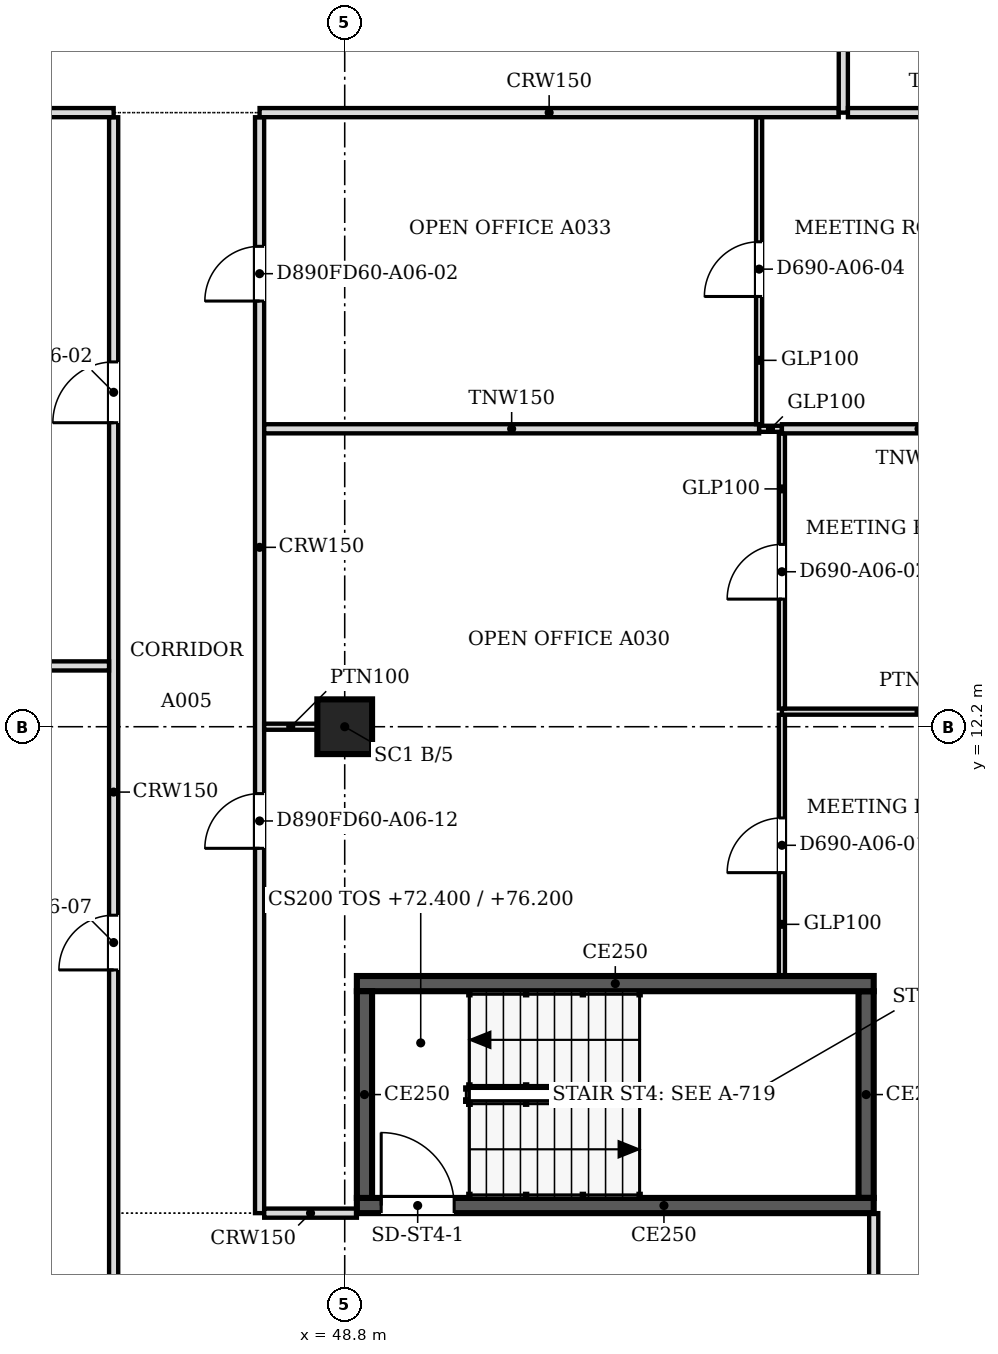
"""IFC4 building model, lengths in metres.
Left out: names, types, materials, properties, quantities, classifications, styles, units other than length and angle.
Written with IfcOpenShell. Run it as: python <this file> out.ifc"""

import sys

from ifc_helpers import new_model, si_unit, direction, frame, frame_2d, origin, origin_2d, place, context, subcontext, project, spatial, polyline, rectangle, outline, extrude, faceted_brep, source, transform, mapped, element, fill, save


model = new_model("IFC4")
c1 = context("Model", 3, precision=1e-05, world=origin(), true_north=direction((0.0, 1.0)))
c2 = subcontext(c1, "Body", "Model", "MODEL_VIEW")
j1 = project(units=[si_unit("LENGTHUNIT", "METRE"), si_unit("PLANEANGLEUNIT", "RADIAN")], contexts=[c1])
p1 = place(None, origin())
s1 = spatial("IfcSite", under=j1, at=p1, CompositionType="ELEMENT")
p2 = place(p1, origin())
s2 = spatial("IfcBuilding", under=s1, at=p2, CompositionType="ELEMENT")
p3 = place(p2, frame((0.0, 0.0, 72.4)))
s3 = spatial("IfcBuildingStorey", under=s2, at=p3, CompositionType="ELEMENT", Elevation=72.4)
p4 = place(p3, frame((48.8, 12.2, 0.0), z_axis=(0.0, 0.0, 1.0), x_axis=(1.0, 0.0, 0.0)))
e1 = element("IfcColumn", 1, at=p4, inside=s3, PredefinedType="COLUMN", context=c2, shape_type="SweptSolid", body=[
    extrude(rectangle(XDim=0.9, YDim=0.9, at=origin_2d()), origin(), (0.0, 0.0, 1.0), 3.6),
])
m1 = source(origin(), c2, "Body", "Brep", [
    faceted_brep([(0.053, -0.25, 0.0), (2.997, -0.25, 3.8), (0.053, -0.25, 7.6), (0.0, -0.25, 7.532), (0.0, -0.25, 0.068), (0.106, 0.25, 7.531), (2.944, 0.25, 3.868), (2.944, 0.25, 3.732), (0.106, 0.25, 0.068), (2.997, 0.0, 3.8), (0.053, 0.0, 0.0), (0.053, 0.0, 7.6)], [[[0, 1, 2, 3, 4]], [[5, 6, 7, 8]], [[8, 7, 9, 1, 0, 10]], [[6, 5, 11, 2, 1, 9]], [[3, 2, 11]], [[10, 0, 4]], [[8, 10, 4, 3, 11, 5]], [[9, 7, 6]]]),
])
p5 = place(p3, frame((57.569, 1.274, -3.8), z_axis=(0.0, 0.0, 1.0), x_axis=(0.707066050402, 0.707147509625, 0.0)))
e2 = element("IfcWall", 2, at=p5, inside=s3, PredefinedType="SOLIDWALL", context=c2, shape_type="MappedRepresentation", body=[
    mapped(m1, transform((0.0, 0.0, 0.0), scale=1.0)),
])
m2 = source(origin(), c2, "Body", "SweptSolid", [
    extrude(outline(polyline([(0.253, 0.666), (2.681, 3.8), (0.253, 6.934), (0.253, 0.666)])), frame((0.0, 0.26, 0.0), z_axis=(0.0, -1.0, 0.0), x_axis=(1.0, 0.0, 0.0)), (0.0, 0.0, 1.0), 0.52),
])
p6 = place(p5, origin())
e3 = element("IfcOpeningElement", 3, at=p6, cuts=e2, PredefinedType="OPENING", context=c2, shape_type="MappedRepresentation", body=[
    mapped(m2, transform((0.0, 0.0, 0.0), scale=1.0)),
])
p7 = place(p2, frame((0.0, 0.0, 76.2)))
s4 = spatial("IfcBuildingStorey", under=s2, at=p7, CompositionType="ELEMENT", Elevation=76.2)
m3 = source(origin(), c2, "Body", "Brep", [
    faceted_brep([(2.944, -0.25, 0.0), (2.997, -0.25, 0.068), (2.997, -0.25, 7.532), (2.944, -0.25, 7.6), (0.0, -0.25, 3.8), (0.053, 0.25, 3.868), (2.891, 0.25, 7.532), (2.891, 0.25, 0.068), (0.053, 0.25, 3.732), (2.944, 0.0, 0.0), (2.944, 0.0, 7.6), (0.0, 0.0, 3.8)], [[[0, 1, 2, 3, 4]], [[5, 6, 7, 8]], [[1, 0, 9]], [[10, 3, 2]], [[6, 5, 11, 4, 3, 10]], [[8, 7, 9, 0, 4, 11]], [[8, 11, 5]], [[1, 9, 7, 6, 10, 2]]]),
])
p8 = place(p7, frame((57.606, 1.312, -3.8), z_axis=(0.0, 0.0, 1.0), x_axis=(0.707147509625, 0.707066050402, 0.0)))
e4 = element("IfcWall", 4, at=p8, inside=s4, PredefinedType="SOLIDWALL", context=c2, shape_type="MappedRepresentation", body=[
    mapped(m3, transform((0.0, 0.0, 0.0), scale=1.0)),
])
m4 = source(origin(), c2, "Body", "SweptSolid", [
    extrude(outline(polyline([(2.744, 6.934), (0.316, 3.8), (2.744, 0.667), (2.744, 6.934)])), frame((0.0, 0.26, 0.0), z_axis=(0.0, -1.0, 0.0), x_axis=(1.0, 0.0, 0.0)), (0.0, 0.0, 1.0), 0.52),
])
p9 = place(p8, origin())
e5 = element("IfcOpeningElement", 5, at=p9, cuts=e4, PredefinedType="OPENING", context=c2, shape_type="MappedRepresentation", body=[
    mapped(m4, transform((0.0, 0.0, 0.0), scale=1.0)),
])
p10 = place(p3, frame((57.5, 4.325, 0.0), z_axis=(0.0, 0.0, 1.0), x_axis=(-1.0, 0.0, 0.0)))
e6 = element("IfcWall", 6, at=p10, inside=s3, PredefinedType="SOLIDWALL", context=c2, shape_type="SweptSolid", body=[
    extrude(rectangle(XDim=8.5, YDim=0.25, at=frame_2d((4.25, 0.0))), origin(), (0.0, 0.0, 1.0), 3.8),
])
m5 = source(origin(), c2, "Body", "SweptSolid", [
    extrude(rectangle(XDim=1.2, YDim=2.1, at=frame_2d((0.6, 1.05))), frame((0.0, 0.135, 0.0), z_axis=(0.0, -1.0, 0.0), x_axis=(1.0, 0.0, 0.0)), (0.0, 0.0, 1.0), 0.27),
])
p11 = place(p10, frame((6.9, 0.0, 0.0)))
e7 = element("IfcOpeningElement", 7, at=p11, cuts=e6, PredefinedType="OPENING", context=c2, shape_type="MappedRepresentation", body=[
    mapped(m5, transform((0.0, 0.0, 0.0), scale=1.0)),
])
p12 = place(p3, frame((49.125, 4.45, 0.0), z_axis=(0.0, 0.0, 1.0), x_axis=(0.0, 1.0, 0.0)))
e8 = element("IfcWall", 8, at=p12, inside=s3, PredefinedType="SOLIDWALL", context=c2, shape_type="SweptSolid", body=[
    extrude(rectangle(XDim=3.4, YDim=0.25, at=frame_2d((1.7, 0.0))), origin(), (0.0, 0.0, 1.0), 3.8),
])
p13 = place(p3, frame((49.0, 7.975, 0.0), z_axis=(0.0, 0.0, 1.0), x_axis=(1.0, 0.0, 0.0)))
e9 = element("IfcWall", 9, at=p13, inside=s3, PredefinedType="SOLIDWALL", context=c2, shape_type="SweptSolid", body=[
    extrude(rectangle(XDim=8.5, YDim=0.25, at=frame_2d((4.25, 0.0))), origin(), (0.0, 0.0, 1.0), 3.8),
])
p14 = place(p3, frame((57.375, 7.85, 0.0), z_axis=(0.0, 0.0, 1.0), x_axis=(0.0, -1.0, 0.0)))
e10 = element("IfcWall", 10, at=p14, inside=s3, PredefinedType="SOLIDWALL", context=c2, shape_type="SweptSolid", body=[
    extrude(rectangle(XDim=3.4, YDim=0.25, at=frame_2d((1.7, 0.0))), origin(), (0.0, 0.0, 1.0), 3.8),
])
p15 = place(p3, frame((45.0, 0.5, 0.0), z_axis=(0.0, 0.0, 1.0), x_axis=(0.0, 1.0, 0.0)))
e11 = element("IfcWall", 11, at=p15, inside=s3, PredefinedType="PARTITIONING", context=c2, shape_type="SweptSolid", body=[
    extrude(rectangle(XDim=21.724, YDim=0.15, at=frame_2d((10.862, 0.0))), origin(), (0.0, 0.0, 1.0), 3.067),
])
m6 = source(origin(), c2, "Body", "SweptSolid", [
    extrude(rectangle(XDim=0.9, YDim=2.1, at=frame_2d((0.45, 1.05))), frame((0.0, 0.085, 0.0), z_axis=(0.0, -1.0, 0.0), x_axis=(1.0, 0.0, 0.0)), (0.0, 0.0, 1.0), 0.17),
])
p16 = place(p15, frame((7.7, 0.0, 0.0)))
e12 = element("IfcOpeningElement", 12, at=p16, cuts=e11, PredefinedType="OPENING", context=c2, shape_type="MappedRepresentation", body=[
    mapped(m6, transform((0.0, 0.0, 0.0), scale=1.0)),
])
m7 = source(origin(), c2, "Body", "SweptSolid", [
    extrude(rectangle(XDim=1.0, YDim=2.1, at=frame_2d((0.5, 1.05))), frame((0.0, 0.085, 0.0), z_axis=(0.0, -1.0, 0.0), x_axis=(1.0, 0.0, 0.0)), (0.0, 0.0, 1.0), 0.17),
])
p17 = place(p15, frame((16.7, 0.0, 0.0)))
e13 = element("IfcOpeningElement", 13, at=p17, cuts=e11, PredefinedType="OPENING", context=c2, shape_type="MappedRepresentation", body=[
    mapped(m7, transform((0.0, 0.0, 0.0), scale=1.0)),
])
p18 = place(p3, frame((57.5, 1.559, 0.0), z_axis=(0.0, 0.0, 1.0), x_axis=(0.0, 1.0, 0.0)))
e14 = element("IfcWall", 14, at=p18, inside=s3, PredefinedType="PARTITIONING", context=c2, shape_type="SweptSolid", body=[
    extrude(rectangle(XDim=2.641, YDim=0.15, at=frame_2d((1.32, 0.0))), origin(), (0.0, 0.0, 1.0), 3.067),
])
p19 = place(p3, frame((47.4, 22.224, 0.0), z_axis=(0.0, 0.0, 1.0), x_axis=(0.0, -1.0, 0.0)))
e15 = element("IfcWall", 15, at=p19, inside=s3, PredefinedType="PARTITIONING", context=c2, shape_type="SweptSolid", body=[
    extrude(rectangle(XDim=18.024, YDim=0.15, at=frame_2d((9.012, 0.0))), origin(), (0.0, 0.0, 1.0), 3.067),
])
p20 = place(p19, frame((2.123, 0.0, 0.0)))
e16 = element("IfcOpeningElement", 16, at=p20, cuts=e15, PredefinedType="OPENING", context=c2, shape_type="MappedRepresentation", body=[
    mapped(m6, transform((0.0, 0.0, 0.0), scale=1.0)),
])
p21 = place(p19, frame((11.124, 0.0, 0.0)))
e17 = element("IfcOpeningElement", 17, at=p21, cuts=e15, PredefinedType="OPENING", context=c2, shape_type="MappedRepresentation", body=[
    mapped(m6, transform((0.0, 0.0, 0.0), scale=1.0)),
])
p22 = place(p3, frame((47.476, 4.2, 0.0), z_axis=(0.0, 0.0, 1.0), x_axis=(1.0, 0.0, 0.0)))
e18 = element("IfcWall", 18, at=p22, inside=s3, PredefinedType="PARTITIONING", context=c2, shape_type="SweptSolid", body=[
    extrude(rectangle(XDim=1.524, YDim=0.15, at=frame_2d((0.762, 0.0))), origin(), (0.0, 0.0, 1.0), 3.067),
])
p23 = place(p3, frame((55.99, 12.397, 0.0), z_axis=(0.0, 0.0, 1.0), x_axis=(0.0, -1.0, 0.0)))
e19 = element("IfcWall", 19, at=p23, inside=s3, PredefinedType="PARTITIONING", context=c2, shape_type="SweptSolid", body=[
    extrude(rectangle(XDim=4.297, YDim=0.1, at=frame_2d((2.148, 0.0))), origin(), (0.0, 0.0, 1.0), 3.067),
])
m8 = source(origin(), c2, "Body", "SweptSolid", [
    extrude(rectangle(XDim=0.9, YDim=2.1, at=frame_2d((0.45, 1.05))), frame((0.0, 0.06, 0.0), z_axis=(0.0, -1.0, 0.0), x_axis=(1.0, 0.0, 0.0)), (0.0, 0.0, 1.0), 0.12),
])
p24 = place(p23, frame((1.697, 0.0, 0.0)))
e20 = element("IfcOpeningElement", 20, at=p24, cuts=e19, PredefinedType="OPENING", context=c2, shape_type="MappedRepresentation", body=[
    mapped(m8, transform((0.0, 0.0, 0.0), scale=1.0)),
])
p25 = place(p3, frame((48.35, 12.2, 0.0), z_axis=(0.0, 0.0, 1.0), x_axis=(-1.0, 0.0, 0.0)))
e21 = element("IfcWall", 21, at=p25, inside=s3, PredefinedType="PARTITIONING", context=c2, shape_type="SweptSolid", body=[
    extrude(rectangle(XDim=0.875, YDim=0.1, at=frame_2d((0.438, 0.0))), origin(), (0.0, 0.0, 1.0), 3.067),
])
p26 = place(p3, frame((55.99, 12.448, 0.0), z_axis=(0.0, 0.0, 1.0), x_axis=(1.0, 0.0, 0.0)))
e22 = element("IfcWall", 22, at=p26, inside=s3, PredefinedType="PARTITIONING", context=c2, shape_type="SweptSolid", body=[
    extrude(rectangle(XDim=4.51, YDim=0.1, at=frame_2d((2.255, 0.0))), origin(), (0.0, 0.0, 1.0), 3.067),
])
p27 = place(p3, frame((55.99, 17.024, 0.0), z_axis=(0.0, 0.0, 1.0), x_axis=(0.0, -1.0, 0.0)))
e23 = element("IfcWall", 23, at=p27, inside=s3, PredefinedType="PARTITIONING", context=c2, shape_type="SweptSolid", body=[
    extrude(rectangle(XDim=4.525, YDim=0.1, at=frame_2d((2.263, 0.0))), origin(), (0.0, 0.0, 1.0), 3.067),
])
p28 = place(p27, frame((1.825, 0.0, 0.0)))
e24 = element("IfcOpeningElement", 24, at=p28, cuts=e23, PredefinedType="OPENING", context=c2, shape_type="MappedRepresentation", body=[
    mapped(m8, transform((0.0, 0.0, 0.0), scale=1.0)),
])
p29 = place(p3, frame((24.55, 13.2, 0.0), z_axis=(0.0, 0.0, 1.0), x_axis=(1.0, 0.0, 0.0)))
e25 = element("IfcWall", 25, at=p29, inside=s3, PredefinedType="PARTITIONING", context=c2, shape_type="SweptSolid", body=[
    extrude(rectangle(XDim=20.374, YDim=0.15, at=frame_2d((10.187, 0.0))), origin(), (0.0, 0.0, 1.0), 3.067),
])
p30 = place(p3, frame((47.476, 17.1, 0.0), z_axis=(0.0, 0.0, 1.0), x_axis=(1.0, 0.0, 0.0)))
e26 = element("IfcWall", 26, at=p30, inside=s3, PredefinedType="PARTITIONING", context=c2, shape_type="SweptSolid", body=[
    extrude(rectangle(XDim=8.139, YDim=0.15, at=frame_2d((4.069, 0.0))), origin(), (0.0, 0.0, 1.0), 3.067),
])
p31 = place(p3, frame((55.616, 17.1, 0.0), z_axis=(0.0, 0.0, 1.0), x_axis=(1.0, 0.0, 0.0)))
e27 = element("IfcWall", 27, at=p31, inside=s3, PredefinedType="PARTITIONING", context=c2, shape_type="SweptSolid", body=[
    extrude(rectangle(XDim=0.373, YDim=0.1, at=frame_2d((0.187, 0.0))), origin(), (0.0, 0.0, 1.0), 3.067),
])
p32 = place(p3, frame((55.99, 17.1, 0.0), z_axis=(0.0, 0.0, 1.0), x_axis=(1.0, 0.0, 0.0)))
e28 = element("IfcWall", 28, at=p32, inside=s3, PredefinedType="PARTITIONING", context=c2, shape_type="SweptSolid", body=[
    extrude(rectangle(XDim=4.51, YDim=0.15, at=frame_2d((2.255, 0.0))), origin(), (0.0, 0.0, 1.0), 3.067),
])
p33 = place(p3, frame((55.615, 22.224, 0.0), z_axis=(0.0, 0.0, 1.0), x_axis=(0.0, -1.0, 0.0)))
e29 = element("IfcWall", 29, at=p33, inside=s3, PredefinedType="PARTITIONING", context=c2, shape_type="SweptSolid", body=[
    extrude(rectangle(XDim=5.048, YDim=0.1, at=frame_2d((2.524, 0.0))), origin(), (0.0, 0.0, 1.0), 3.067),
])
p34 = place(p33, frame((2.048, 0.0, 0.0)))
e30 = element("IfcOpeningElement", 30, at=p34, cuts=e29, PredefinedType="OPENING", context=c2, shape_type="MappedRepresentation", body=[
    mapped(m8, transform((0.0, 0.0, 0.0), scale=1.0)),
])
p35 = place(p3, frame((30.5, 22.3, 0.0), z_axis=(0.0, 0.0, 1.0), x_axis=(1.0, 0.0, 0.0)))
e31 = element("IfcWall", 31, at=p35, inside=s3, PredefinedType="PARTITIONING", context=c2, shape_type="SweptSolid", body=[
    extrude(rectangle(XDim=14.5, YDim=0.15, at=frame_2d((7.25, 0.0))), origin(), (0.0, 0.0, 1.0), 3.067),
])
p36 = place(p3, frame((47.4, 22.3, 0.0), z_axis=(0.0, 0.0, 1.0), x_axis=(1.0, 0.0, 0.0)))
e32 = element("IfcWall", 32, at=p36, inside=s3, PredefinedType="PARTITIONING", context=c2, shape_type="SweptSolid", body=[
    extrude(rectangle(XDim=9.524, YDim=0.15, at=frame_2d((4.762, 0.0))), origin(), (0.0, 0.0, 1.0), 3.067),
])
p37 = place(p3, frame((57.0, 30.6, 0.0), z_axis=(0.0, 0.0, 1.0), x_axis=(0.0, -1.0, 0.0)))
e33 = element("IfcWall", 33, at=p37, inside=s3, PredefinedType="PARTITIONING", context=c2, shape_type="SweptSolid", body=[
    extrude(rectangle(XDim=8.3, YDim=0.15, at=frame_2d((4.15, 0.0))), origin(), (0.0, 0.0, 1.0), 3.067),
])
p38 = place(p37, frame((3.7, 0.0, 0.0)))
e34 = element("IfcOpeningElement", 34, at=p38, cuts=e33, PredefinedType="OPENING", context=c2, shape_type="MappedRepresentation", body=[
    mapped(m6, transform((0.0, 0.0, 0.0), scale=1.0)),
])
p39 = place(p3, frame((57.076, 22.3, 0.0), z_axis=(0.0, 0.0, 1.0), x_axis=(1.0, 0.0, 0.0)))
e35 = element("IfcWall", 35, at=p39, inside=s3, PredefinedType="PARTITIONING", context=c2, shape_type="SweptSolid", body=[
    extrude(rectangle(XDim=3.424, YDim=0.15, at=frame_2d((1.712, 0.0))), origin(), (0.0, 0.0, 1.0), 3.067),
])
m9 = source(origin(), c2, "Body", "SweptSolid", [
    extrude(rectangle(XDim=1.2, YDim=2.1, at=frame_2d((0.6, 1.05))), frame((0.0, 0.025, 0.0), z_axis=(0.0, -1.0, 0.0), x_axis=(1.0, 0.0, 0.0)), (0.0, 0.0, 1.0), 0.05),
])
p40 = place(p11, origin())
e36 = element("IfcDoor", 36, at=p40, inside=s3, OperationType="SINGLE_SWING_RIGHT", PredefinedType="DOOR", context=c2, shape_type="MappedRepresentation", body=[
    mapped(m9, transform((0.0, 0.0, 0.0), scale=1.0)),
])
fill(e7, e36)
m10 = source(origin(), c2, "Body", "SweptSolid", [
    extrude(rectangle(XDim=0.9, YDim=2.1, at=frame_2d((0.45, 1.05))), frame((0.0, 0.025, 0.0), z_axis=(0.0, -1.0, 0.0), x_axis=(1.0, 0.0, 0.0)), (0.0, 0.0, 1.0), 0.05),
])
p41 = place(p24, origin())
e37 = element("IfcDoor", 37, at=p41, inside=s3, OperationType="SINGLE_SWING_RIGHT", PredefinedType="DOOR", context=c2, shape_type="MappedRepresentation", body=[
    mapped(m10, transform((0.0, 0.0, 0.0), scale=1.0)),
])
fill(e20, e37)
p42 = place(p28, origin())
e38 = element("IfcDoor", 38, at=p42, inside=s3, OperationType="SINGLE_SWING_RIGHT", PredefinedType="DOOR", context=c2, shape_type="MappedRepresentation", body=[
    mapped(m10, transform((0.0, 0.0, 0.0), scale=1.0)),
])
fill(e24, e38)
p43 = place(p34, origin())
e39 = element("IfcDoor", 39, at=p43, inside=s3, OperationType="SINGLE_SWING_RIGHT", PredefinedType="DOOR", context=c2, shape_type="MappedRepresentation", body=[
    mapped(m10, transform((0.0, 0.0, 0.0), scale=1.0)),
])
fill(e30, e39)
p44 = place(p20, origin())
e40 = element("IfcDoor", 40, at=p44, inside=s3, OperationType="SINGLE_SWING_RIGHT", PredefinedType="DOOR", context=c2, shape_type="MappedRepresentation", body=[
    mapped(m10, transform((0.0, 0.0, 0.0), scale=1.0)),
])
fill(e16, e40)
p45 = place(p16, origin())
e41 = element("IfcDoor", 41, at=p45, inside=s3, OperationType="SINGLE_SWING_LEFT", PredefinedType="DOOR", context=c2, shape_type="MappedRepresentation", body=[
    mapped(m10, transform((0.0, 0.0, 0.0), scale=1.0)),
])
fill(e12, e41)
m11 = source(origin(), c2, "Body", "SweptSolid", [
    extrude(rectangle(XDim=1.0, YDim=2.1, at=frame_2d((0.5, 1.05))), frame((0.0, 0.025, 0.0), z_axis=(0.0, -1.0, 0.0), x_axis=(1.0, 0.0, 0.0)), (0.0, 0.0, 1.0), 0.05),
])
p46 = place(p17, origin())
e42 = element("IfcDoor", 42, at=p46, inside=s3, OperationType="SINGLE_SWING_LEFT", PredefinedType="DOOR", context=c2, shape_type="MappedRepresentation", body=[
    mapped(m11, transform((0.0, 0.0, 0.0), scale=1.0)),
])
fill(e13, e42)
p47 = place(p21, origin())
e43 = element("IfcDoor", 43, at=p47, inside=s3, OperationType="SINGLE_SWING_RIGHT", PredefinedType="DOOR", context=c2, shape_type="MappedRepresentation", body=[
    mapped(m10, transform((0.0, 0.0, 0.0), scale=1.0)),
])
fill(e17, e43)
save(model, sys.argv[1])
